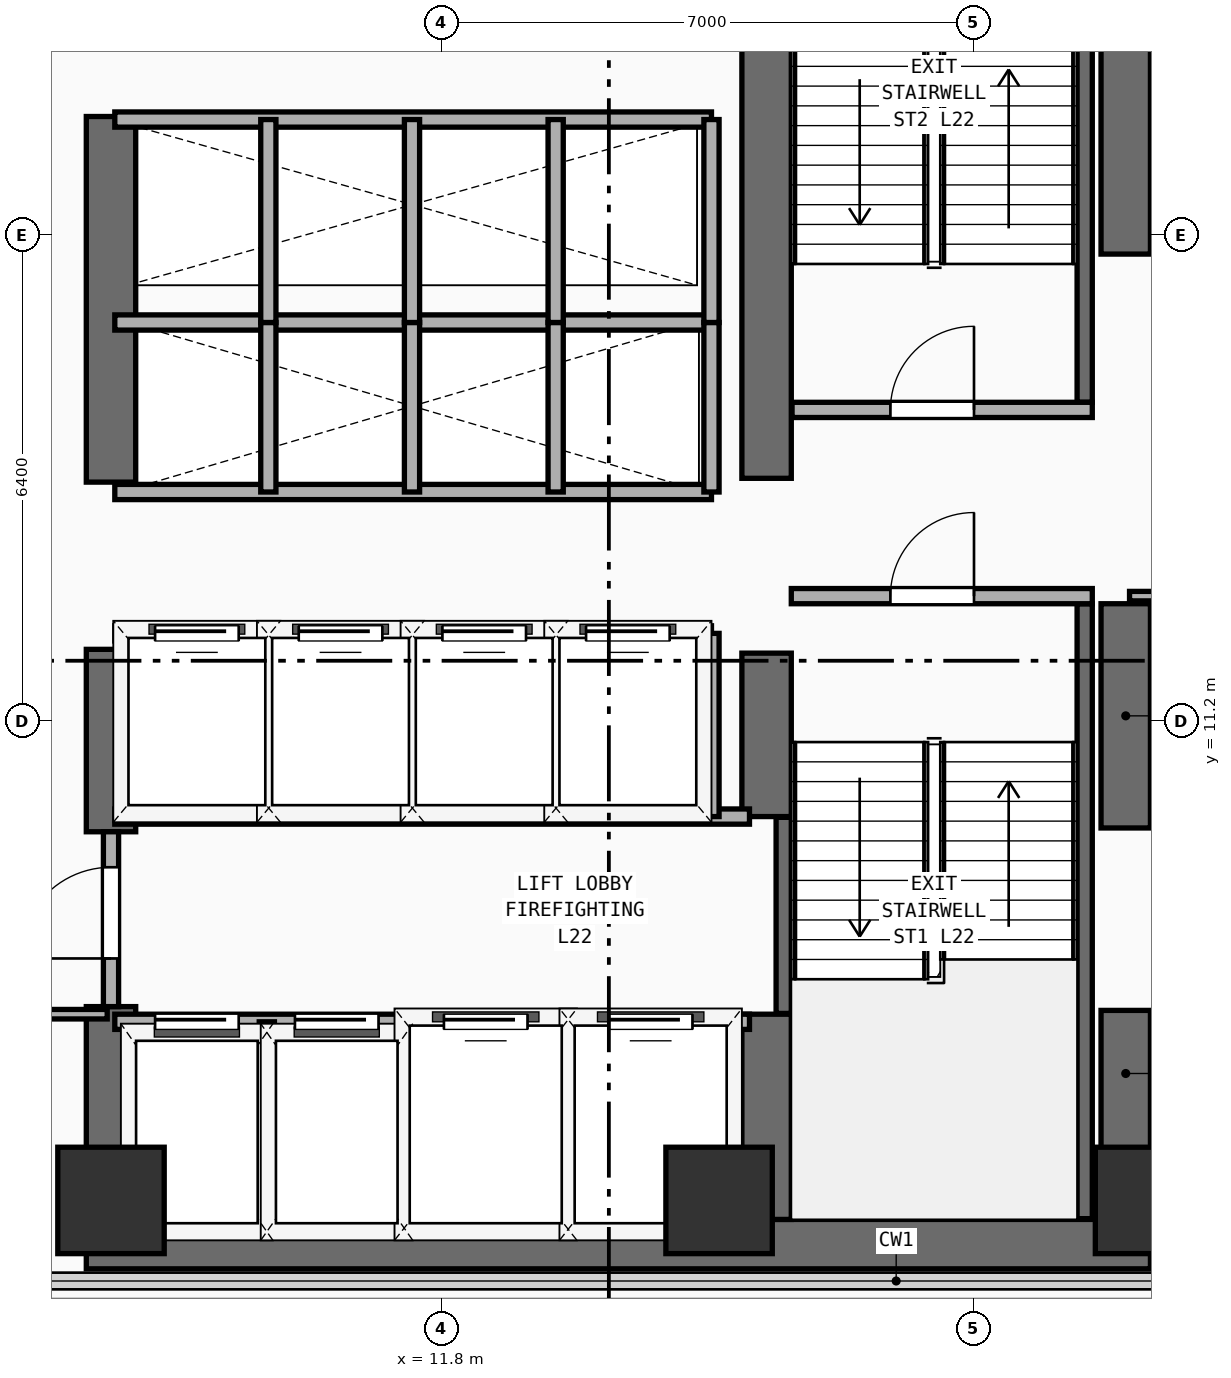
"""IFC4 building model, lengths in metres.
Left out: names, types, materials, properties, quantities, classifications, styles, units other than length and angle.
Written with IfcOpenShell. Run it as: python <this file> out.ifc"""

import sys

from ifc_helpers import new_model, si_unit, direction, frame, frame_2d, origin, origin_2d, place, context, subcontext, project, spatial, rectangle, extrude, element, fill, save


model = new_model("IFC4")
c1 = context("Model", 3, precision=1e-05, world=origin(), true_north=direction((0.0, 1.0)))
c2 = subcontext(c1, "Body", "Model", "MODEL_VIEW")
j1 = project(units=[si_unit("LENGTHUNIT", "METRE"), si_unit("PLANEANGLEUNIT", "RADIAN")], contexts=[c1])
p1 = place(None, origin())
s1 = spatial("IfcSite", under=j1, at=p1, CompositionType="ELEMENT")
p2 = place(p1, origin())
s2 = spatial("IfcBuilding", under=s1, at=p2, CompositionType="ELEMENT")
p3 = place(p2, frame((0.0, 0.0, 87.9)))
s3 = spatial("IfcBuildingStorey", under=s2, at=p3, CompositionType="ELEMENT", Elevation=87.9)
p4 = place(p3, frame((7.125, 4.325, 0.0), z_axis=(0.0, 0.0, 1.0), x_axis=(1.0, 0.0, 0.0)))
e1 = element("IfcWall", 1, at=p4, inside=s3, PredefinedType="SHEAR", context=c2, shape_type="SweptSolid", body=[
    extrude(rectangle(XDim=14.0, YDim=0.65, at=frame_2d((7.0, 0.0))), origin(), (0.0, 0.0, 1.0), 3.54),
])
p5 = place(p3, frame((7.45, 4.65, 0.0), z_axis=(0.0, 0.0, 1.0), x_axis=(0.0, 1.0, 0.0)))
e2 = element("IfcWall", 2, at=p5, inside=s3, PredefinedType="SHEAR", context=c2, shape_type="SweptSolid", body=[
    extrude(rectangle(XDim=2.8, YDim=0.65, at=frame_2d((1.4, 0.0))), origin(), (0.0, 0.0, 1.0), 3.54),
])
p6 = place(p3, frame((7.45, 9.75, 0.0), z_axis=(0.0, 0.0, 1.0), x_axis=(0.0, 1.0, 0.0)))
e3 = element("IfcWall", 3, at=p6, inside=s3, PredefinedType="SHEAR", context=c2, shape_type="SweptSolid", body=[
    extrude(rectangle(XDim=2.4, YDim=0.65, at=frame_2d((1.2, 0.0))), origin(), (0.0, 0.0, 1.0), 3.54),
])
p7 = place(p3, frame((7.45, 14.35, 0.0), z_axis=(0.0, 0.0, 1.0), x_axis=(0.0, 1.0, 0.0)))
e4 = element("IfcWall", 4, at=p7, inside=s3, PredefinedType="SHEAR", context=c2, shape_type="SweptSolid", body=[
    extrude(rectangle(XDim=4.81, YDim=0.65, at=frame_2d((2.405, 0.0))), origin(), (0.0, 0.0, 1.0), 3.54),
])
p8 = place(p3, frame((20.8, 4.65, 0.0), z_axis=(0.0, 0.0, 1.0), x_axis=(0.0, 1.0, 0.0)))
e5 = element("IfcWall", 5, at=p8, inside=s3, PredefinedType="SHEAR", context=c2, shape_type="SweptSolid", body=[
    extrude(rectangle(XDim=2.75, YDim=0.65, at=frame_2d((1.375, 0.0))), origin(), (0.0, 0.0, 1.0), 3.54),
])
p9 = place(p3, frame((20.8, 9.8, 0.0), z_axis=(0.0, 0.0, 1.0), x_axis=(0.0, 1.0, 0.0)))
e6 = element("IfcWall", 6, at=p9, inside=s3, PredefinedType="SHEAR", context=c2, shape_type="SweptSolid", body=[
    extrude(rectangle(XDim=2.95, YDim=0.65, at=frame_2d((1.475, 0.0))), origin(), (0.0, 0.0, 1.0), 3.54),
])
p10 = place(p3, frame((20.8, 17.35, 0.0), z_axis=(0.0, 0.0, 1.0), x_axis=(0.0, 1.0, 0.0)))
e7 = element("IfcWall", 7, at=p10, inside=s3, PredefinedType="SHEAR", context=c2, shape_type="SweptSolid", body=[
    extrude(rectangle(XDim=6.15, YDim=0.65, at=frame_2d((3.075, 0.0))), origin(), (0.0, 0.0, 1.0), 3.54),
])
p11 = place(p3, frame((16.075, 4.65, 0.0), z_axis=(0.0, 0.0, 1.0), x_axis=(0.0, 1.0, 0.0)))
e8 = element("IfcWall", 8, at=p11, inside=s3, PredefinedType="SHEAR", context=c2, shape_type="SweptSolid", body=[
    extrude(rectangle(XDim=2.7, YDim=0.65, at=frame_2d((1.35, 0.0))), origin(), (0.0, 0.0, 1.0), 3.54),
])
p12 = place(p3, frame((16.075, 9.95, 0.0), z_axis=(0.0, 0.0, 1.0), x_axis=(0.0, 1.0, 0.0)))
e9 = element("IfcWall", 9, at=p12, inside=s3, PredefinedType="SHEAR", context=c2, shape_type="SweptSolid", body=[
    extrude(rectangle(XDim=2.15, YDim=0.65, at=frame_2d((1.075, 0.0))), origin(), (0.0, 0.0, 1.0), 3.54),
])
p13 = place(p3, frame((16.075, 14.4, 0.0), z_axis=(0.0, 0.0, 1.0), x_axis=(0.0, 1.0, 0.0)))
e10 = element("IfcWall", 10, at=p13, inside=s3, PredefinedType="SHEAR", context=c2, shape_type="SweptSolid", body=[
    extrude(rectangle(XDim=9.1, YDim=0.65, at=frame_2d((4.55, 0.0))), origin(), (0.0, 0.0, 1.0), 3.54),
])
for number, where, z_axis, x_axis in (
    (11, (7.45, 4.9, 0.0), (0.0, 0.0, 1.0), (1.0, 0.0, 0.0)),
    (12, (15.45, 4.9, 0.0), (0.0, 0.0, 1.0), (1.0, 0.0, 0.0)),
    (13, (21.1, 4.9, 0.0), (0.0, 0.0, 1.0), (1.0, 0.0, 0.0)),
):
    element("IfcColumn", number, at=place(p3, frame(where, z_axis=z_axis, x_axis=x_axis)), inside=s3, PredefinedType="COLUMN", context=c2, shape_type="SweptSolid", body=[
        extrude(rectangle(XDim=1.4, YDim=1.4, at=origin_2d()), origin(), (0.0, 0.0, 1.0), 3.54),
    ])
p14 = place(p3, frame((16.3, 7.36, 0.0), z_axis=(0.0, 0.0, 1.0), x_axis=(0.0, 1.0, 0.0)))
e14 = element("IfcWall", 14, at=p14, inside=s3, PredefinedType="SHEAR", context=c2, shape_type="SweptSolid", body=[
    extrude(rectangle(XDim=2.58, YDim=0.2, at=frame_2d((1.29, 0.0))), origin(), (0.0, 0.0, 1.0), 3.54),
])
p15 = place(p3, frame((20.26, 4.66, 0.0), z_axis=(0.0, 0.0, 1.0), x_axis=(0.0, 1.0, 0.0)))
e15 = element("IfcWall", 15, at=p15, inside=s3, PredefinedType="SHEAR", context=c2, shape_type="SweptSolid", body=[
    extrude(rectangle(XDim=8.09, YDim=0.2, at=frame_2d((4.045, 0.0))), origin(), (0.0, 0.0, 1.0), 3.54),
])
p16 = place(p3, frame((16.4, 12.85, 0.0), z_axis=(0.0, 0.0, 1.0), x_axis=(1.0, 0.0, 0.0)))
e16 = element("IfcWall", 16, at=p16, inside=s3, PredefinedType="PARTITIONING", context=c2, shape_type="SweptSolid", body=[
    extrude(rectangle(XDim=3.96, YDim=0.2, at=frame_2d((1.98, 0.0))), origin(), (0.0, 0.0, 1.0), 3.54),
])
p17 = place(p16, frame((1.304, 0.0, 0.0)))
e17 = element("IfcOpeningElement", 17, at=p17, cuts=e16, PredefinedType="OPENING", context=c2, shape_type="SweptSolid", body=[
    extrude(rectangle(XDim=1.1, YDim=2.2, at=frame_2d((0.55, 1.1))), frame((0.0, 0.11, 0.0), z_axis=(0.0, -1.0, 0.0), x_axis=(1.0, 0.0, 0.0)), (0.0, 0.0, 1.0), 0.22),
])
p18 = place(p3, frame((20.26, 15.4, 0.0), z_axis=(0.0, 0.0, 1.0), x_axis=(0.0, 1.0, 0.0)))
e18 = element("IfcWall", 18, at=p18, inside=s3, PredefinedType="SHEAR", context=c2, shape_type="SweptSolid", body=[
    extrude(rectangle(XDim=8.09, YDim=0.2, at=frame_2d((4.045, 0.0))), origin(), (0.0, 0.0, 1.0), 3.54),
])
p19 = place(p3, frame((16.41, 15.3, 0.0), z_axis=(0.0, 0.0, 1.0), x_axis=(1.0, 0.0, 0.0)))
e19 = element("IfcWall", 19, at=p19, inside=s3, PredefinedType="PARTITIONING", context=c2, shape_type="SweptSolid", body=[
    extrude(rectangle(XDim=3.95, YDim=0.2, at=frame_2d((1.975, 0.0))), origin(), (0.0, 0.0, 1.0), 3.54),
])
p20 = place(p19, frame((1.294, 0.0, 0.0)))
e20 = element("IfcOpeningElement", 20, at=p20, cuts=e19, PredefinedType="OPENING", context=c2, shape_type="SweptSolid", body=[
    extrude(rectangle(XDim=1.1, YDim=2.2, at=frame_2d((0.55, 1.1))), frame((0.0, 0.11, 0.0), z_axis=(0.0, -1.0, 0.0), x_axis=(1.0, 0.0, 0.0)), (0.0, 0.0, 1.0), 0.22),
])
p21 = place(p3, frame((7.5, 7.25, 0.0), z_axis=(0.0, 0.0, 1.0), x_axis=(1.0, 0.0, 0.0)))
e21 = element("IfcWall", 21, at=p21, inside=s3, PredefinedType="PARTITIONING", context=c2, shape_type="SweptSolid", body=[
    extrude(rectangle(XDim=8.35, YDim=0.2, at=frame_2d((4.175, 0.0))), origin(), (0.0, 0.0, 1.0), 3.54),
])
p22 = place(p21, frame((0.53, 0.0, 0.0)))
e22 = element("IfcOpeningElement", 22, at=p22, cuts=e21, PredefinedType="OPENING", context=c2, shape_type="SweptSolid", body=[
    extrude(rectangle(XDim=1.1, YDim=2.2, at=frame_2d((0.55, 1.1))), frame((0.0, 0.11, 0.0), z_axis=(0.0, -1.0, 0.0), x_axis=(1.0, 0.0, 0.0)), (0.0, 0.0, 1.0), 0.22),
])
p23 = place(p21, frame((2.37, 0.0, 0.0)))
e23 = element("IfcOpeningElement", 23, at=p23, cuts=e21, PredefinedType="OPENING", context=c2, shape_type="SweptSolid", body=[
    extrude(rectangle(XDim=1.1, YDim=2.2, at=frame_2d((0.55, 1.1))), frame((0.0, 0.11, 0.0), z_axis=(0.0, -1.0, 0.0), x_axis=(1.0, 0.0, 0.0)), (0.0, 0.0, 1.0), 0.22),
])
p24 = place(p21, frame((4.33, 0.0, 0.0)))
e24 = element("IfcOpeningElement", 24, at=p24, cuts=e21, PredefinedType="OPENING", context=c2, shape_type="SweptSolid", body=[
    extrude(rectangle(XDim=1.1, YDim=2.2, at=frame_2d((0.55, 1.1))), frame((0.0, 0.11, 0.0), z_axis=(0.0, -1.0, 0.0), x_axis=(1.0, 0.0, 0.0)), (0.0, 0.0, 1.0), 0.22),
])
p25 = place(p21, frame((6.5, 0.0, 0.0)))
e25 = element("IfcOpeningElement", 25, at=p25, cuts=e21, PredefinedType="OPENING", context=c2, shape_type="SweptSolid", body=[
    extrude(rectangle(XDim=1.1, YDim=2.2, at=frame_2d((0.55, 1.1))), frame((0.0, 0.11, 0.0), z_axis=(0.0, -1.0, 0.0), x_axis=(1.0, 0.0, 0.0)), (0.0, 0.0, 1.0), 0.22),
])
p26 = place(p3, frame((7.5, 9.95, 0.0), z_axis=(0.0, 0.0, 1.0), x_axis=(1.0, 0.0, 0.0)))
e26 = element("IfcWall", 26, at=p26, inside=s3, PredefinedType="PARTITIONING", context=c2, shape_type="SweptSolid", body=[
    extrude(rectangle(XDim=8.35, YDim=0.2, at=frame_2d((4.175, 0.0))), origin(), (0.0, 0.0, 1.0), 3.54),
])
for number, where, z_axis, x_axis in (
    (27, (9.5, 4.45, 0.0), (0.0, 0.0, 1.0), (0.0, 1.0, 0.0)),
    (28, (11.36, 4.45, 0.0), (0.0, 0.0, 1.0), (0.0, 1.0, 0.0)),
    (29, (13.46, 4.45, 0.0), (0.0, 0.0, 1.0), (0.0, 1.0, 0.0)),
):
    element("IfcWall", number, at=place(p3, frame(where, z_axis=z_axis, x_axis=x_axis)), inside=s3, PredefinedType="PARTITIONING", context=c2, shape_type="SweptSolid", body=[
        extrude(rectangle(XDim=2.8, YDim=0.2, at=frame_2d((1.4, 0.0))), origin(), (0.0, 0.0, 1.0), 3.54),
    ])
p27 = place(p3, frame((7.45, 7.45, 0.0), z_axis=(0.0, 0.0, 1.0), x_axis=(0.0, 1.0, 0.0)))
e30 = element("IfcWall", 30, at=p27, inside=s3, PredefinedType="PARTITIONING", context=c2, shape_type="SweptSolid", body=[
    extrude(rectangle(XDim=2.3, YDim=0.2, at=frame_2d((1.15, 0.0))), origin(), (0.0, 0.0, 1.0), 2.52),
])
p28 = place(p27, frame((0.633, 0.0, 0.0)))
e31 = element("IfcOpeningElement", 31, at=p28, cuts=e30, PredefinedType="OPENING", context=c2, shape_type="SweptSolid", body=[
    extrude(rectangle(XDim=1.2, YDim=2.25, at=frame_2d((0.6, 1.125))), frame((0.0, 0.11, 0.0), z_axis=(0.0, -1.0, 0.0), x_axis=(1.0, 0.0, 0.0)), (0.0, 0.0, 1.0), 0.22),
])
p29 = place(p3, frame((7.5, 12.36, 0.0), z_axis=(0.0, 0.0, 1.0), x_axis=(1.0, 0.0, 0.0)))
e32 = element("IfcWall", 32, at=p29, inside=s3, PredefinedType="PARTITIONING", context=c2, shape_type="SweptSolid", body=[
    extrude(rectangle(XDim=7.85, YDim=0.2, at=frame_2d((3.925, 0.0))), origin(), (0.0, 0.0, 1.0), 3.54),
])
p30 = place(p29, frame((0.53, 0.0, 0.0)))
e33 = element("IfcOpeningElement", 33, at=p30, cuts=e32, PredefinedType="OPENING", context=c2, shape_type="SweptSolid", body=[
    extrude(rectangle(XDim=1.1, YDim=2.2, at=frame_2d((0.55, 1.1))), frame((0.0, 0.11, 0.0), z_axis=(0.0, -1.0, 0.0), x_axis=(1.0, 0.0, 0.0)), (0.0, 0.0, 1.0), 0.22),
])
p31 = place(p29, frame((2.42, 0.0, 0.0)))
e34 = element("IfcOpeningElement", 34, at=p31, cuts=e32, PredefinedType="OPENING", context=c2, shape_type="SweptSolid", body=[
    extrude(rectangle(XDim=1.1, YDim=2.2, at=frame_2d((0.55, 1.1))), frame((0.0, 0.11, 0.0), z_axis=(0.0, -1.0, 0.0), x_axis=(1.0, 0.0, 0.0)), (0.0, 0.0, 1.0), 0.22),
])
p32 = place(p29, frame((4.31, 0.0, 0.0)))
e35 = element("IfcOpeningElement", 35, at=p32, cuts=e32, PredefinedType="OPENING", context=c2, shape_type="SweptSolid", body=[
    extrude(rectangle(XDim=1.1, YDim=2.2, at=frame_2d((0.55, 1.1))), frame((0.0, 0.11, 0.0), z_axis=(0.0, -1.0, 0.0), x_axis=(1.0, 0.0, 0.0)), (0.0, 0.0, 1.0), 0.22),
])
p33 = place(p29, frame((6.2, 0.0, 0.0)))
e36 = element("IfcOpeningElement", 36, at=p33, cuts=e32, PredefinedType="OPENING", context=c2, shape_type="SweptSolid", body=[
    extrude(rectangle(XDim=1.1, YDim=2.2, at=frame_2d((0.55, 1.1))), frame((0.0, 0.11, 0.0), z_axis=(0.0, -1.0, 0.0), x_axis=(1.0, 0.0, 0.0)), (0.0, 0.0, 1.0), 0.22),
])
for number, where, z_axis, x_axis in (
    (37, (15.35, 9.95, 0.0), (0.0, 0.0, 1.0), (0.0, 1.0, 0.0)),
    (38, (9.52, 9.95, 0.0), (0.0, 0.0, 1.0), (0.0, 1.0, 0.0)),
    (39, (11.41, 9.95, 0.0), (0.0, 0.0, 1.0), (0.0, 1.0, 0.0)),
    (40, (13.3, 9.95, 0.0), (0.0, 0.0, 1.0), (0.0, 1.0, 0.0)),
):
    element("IfcWall", number, at=place(p3, frame(where, z_axis=z_axis, x_axis=x_axis)), inside=s3, PredefinedType="PARTITIONING", context=c2, shape_type="SweptSolid", body=[
        extrude(rectangle(XDim=2.41, YDim=0.2, at=frame_2d((1.205, 0.0))), origin(), (0.0, 0.0, 1.0), 3.54),
    ])
for number, where, z_axis, x_axis in (
    (41, (7.5, 14.22, 0.0), (0.0, 0.0, 1.0), (1.0, 0.0, 0.0)),
    (42, (7.5, 16.45, 0.0), (0.0, 0.0, 1.0), (1.0, 0.0, 0.0)),
):
    element("IfcWall", number, at=place(p3, frame(where, z_axis=z_axis, x_axis=x_axis)), inside=s3, PredefinedType="PARTITIONING", context=c2, shape_type="SweptSolid", body=[
        extrude(rectangle(XDim=7.85, YDim=0.2, at=frame_2d((3.925, 0.0))), origin(), (0.0, 0.0, 1.0), 3.54),
    ])
for number, where, z_axis, x_axis in (
    (43, (15.35, 14.22, 0.0), (0.0, 0.0, 1.0), (0.0, 1.0, 0.0)),
    (44, (9.52, 14.22, 0.0), (0.0, 0.0, 1.0), (0.0, 1.0, 0.0)),
    (45, (11.41, 14.22, 0.0), (0.0, 0.0, 1.0), (0.0, 1.0, 0.0)),
    (46, (13.3, 14.22, 0.0), (0.0, 0.0, 1.0), (0.0, 1.0, 0.0)),
):
    element("IfcWall", number, at=place(p3, frame(where, z_axis=z_axis, x_axis=x_axis)), inside=s3, PredefinedType="PARTITIONING", context=c2, shape_type="SweptSolid", body=[
        extrude(rectangle(XDim=2.23, YDim=0.2, at=frame_2d((1.115, 0.0))), origin(), (0.0, 0.0, 1.0), 3.54),
    ])
p34 = place(p3, frame((7.5, 19.12, 0.0), z_axis=(0.0, 0.0, 1.0), x_axis=(1.0, 0.0, 0.0)))
e47 = element("IfcWall", 47, at=p34, inside=s3, PredefinedType="PARTITIONING", context=c2, shape_type="SweptSolid", body=[
    extrude(rectangle(XDim=7.85, YDim=0.2, at=frame_2d((3.925, 0.0))), origin(), (0.0, 0.0, 1.0), 3.54),
])
for number, where, z_axis, x_axis in (
    (48, (15.35, 16.45, 0.0), (0.0, 0.0, 1.0), (0.0, 1.0, 0.0)),
    (49, (9.52, 16.45, 0.0), (0.0, 0.0, 1.0), (0.0, 1.0, 0.0)),
    (50, (11.41, 16.45, 0.0), (0.0, 0.0, 1.0), (0.0, 1.0, 0.0)),
    (51, (13.3, 16.45, 0.0), (0.0, 0.0, 1.0), (0.0, 1.0, 0.0)),
):
    element("IfcWall", number, at=place(p3, frame(where, z_axis=z_axis, x_axis=x_axis)), inside=s3, PredefinedType="PARTITIONING", context=c2, shape_type="SweptSolid", body=[
        extrude(rectangle(XDim=2.67, YDim=0.2, at=frame_2d((1.335, 0.0))), origin(), (0.0, 0.0, 1.0), 3.54),
    ])
p35 = place(p3, frame((1.64, 7.35, 0.0), z_axis=(0.0, 0.0, 1.0), x_axis=(1.0, 0.0, 0.0)))
e52 = element("IfcWall", 52, at=p35, inside=s3, PredefinedType="PARTITIONING", context=c2, shape_type="SweptSolid", body=[
    extrude(rectangle(XDim=5.76, YDim=0.125, at=frame_2d((2.88, 0.0))), origin(), (0.0, 0.0, 1.0), 3.54),
])
p36 = place(p35, frame((4.087, 0.0, 0.0)))
e53 = element("IfcOpeningElement", 53, at=p36, cuts=e52, PredefinedType="OPENING", context=c2, shape_type="SweptSolid", body=[
    extrude(rectangle(XDim=0.85, YDim=2.15, at=frame_2d((0.425, 1.075))), frame((0.0, 0.073, 0.0), z_axis=(0.0, -1.0, 0.0), x_axis=(1.0, 0.0, 0.0)), (0.0, 0.0, 1.0), 0.145),
])
p37 = place(p3, frame((20.85, 12.85, 0.0), z_axis=(0.0, 0.0, 1.0), x_axis=(1.0, 0.0, 0.0)))
e54 = element("IfcWall", 54, at=p37, inside=s3, PredefinedType="PARTITIONING", context=c2, shape_type="SweptSolid", body=[
    extrude(rectangle(XDim=7.05, YDim=0.125, at=frame_2d((3.525, 0.0))), origin(), (0.0, 0.0, 1.0), 3.54),
])
p38 = place(p37, frame((2.8, 0.0, 0.0)))
e55 = element("IfcOpeningElement", 55, at=p38, cuts=e54, PredefinedType="OPENING", context=c2, shape_type="SweptSolid", body=[
    extrude(rectangle(XDim=0.95, YDim=2.15, at=frame_2d((0.475, 1.075))), frame((0.0, 0.073, 0.0), z_axis=(0.0, -1.0, 0.0), x_axis=(1.0, 0.0, 0.0)), (0.0, 0.0, 1.0), 0.145),
])
p39 = place(p17, frame((1.1, 0.0, 0.0), z_axis=(0.0, 0.0, 1.0), x_axis=(-1.0, 0.0, 0.0)))
e56 = element("IfcDoor", 56, at=p39, inside=s3, OperationType="SINGLE_SWING_LEFT", PredefinedType="DOOR", context=c2, shape_type="SweptSolid", body=[
    extrude(rectangle(XDim=1.1, YDim=2.2, at=frame_2d((0.55, 1.1))), frame((0.0, 0.025, 0.0), z_axis=(0.0, -1.0, 0.0), x_axis=(1.0, 0.0, 0.0)), (0.0, 0.0, 1.0), 0.05),
])
fill(e17, e56)
p40 = place(p20, origin())
e57 = element("IfcDoor", 57, at=p40, inside=s3, OperationType="SINGLE_SWING_RIGHT", PredefinedType="DOOR", context=c2, shape_type="SweptSolid", body=[
    extrude(rectangle(XDim=1.1, YDim=2.2, at=frame_2d((0.55, 1.1))), frame((0.0, 0.025, 0.0), z_axis=(0.0, -1.0, 0.0), x_axis=(1.0, 0.0, 0.0)), (0.0, 0.0, 1.0), 0.05),
])
fill(e20, e57)
p41 = place(p22, origin())
e58 = element("IfcDoor", 58, at=p41, inside=s3, OperationType="SLIDING_TO_LEFT", PredefinedType="DOOR", context=c2, shape_type="SweptSolid", body=[
    extrude(rectangle(XDim=1.1, YDim=2.2, at=frame_2d((0.55, 1.1))), frame((0.0, 0.025, 0.0), z_axis=(0.0, -1.0, 0.0), x_axis=(1.0, 0.0, 0.0)), (0.0, 0.0, 1.0), 0.05),
])
fill(e22, e58)
p42 = place(p23, origin())
e59 = element("IfcDoor", 59, at=p42, inside=s3, OperationType="SLIDING_TO_LEFT", PredefinedType="DOOR", context=c2, shape_type="SweptSolid", body=[
    extrude(rectangle(XDim=1.1, YDim=2.2, at=frame_2d((0.55, 1.1))), frame((0.0, 0.025, 0.0), z_axis=(0.0, -1.0, 0.0), x_axis=(1.0, 0.0, 0.0)), (0.0, 0.0, 1.0), 0.05),
])
fill(e23, e59)
p43 = place(p24, origin())
e60 = element("IfcDoor", 60, at=p43, inside=s3, OperationType="SLIDING_TO_LEFT", PredefinedType="DOOR", context=c2, shape_type="SweptSolid", body=[
    extrude(rectangle(XDim=1.1, YDim=2.2, at=frame_2d((0.55, 1.1))), frame((0.0, 0.025, 0.0), z_axis=(0.0, -1.0, 0.0), x_axis=(1.0, 0.0, 0.0)), (0.0, 0.0, 1.0), 0.05),
])
fill(e24, e60)
p44 = place(p25, origin())
e61 = element("IfcDoor", 61, at=p44, inside=s3, OperationType="SLIDING_TO_LEFT", PredefinedType="DOOR", context=c2, shape_type="SweptSolid", body=[
    extrude(rectangle(XDim=1.1, YDim=2.2, at=frame_2d((0.55, 1.1))), frame((0.0, 0.025, 0.0), z_axis=(0.0, -1.0, 0.0), x_axis=(1.0, 0.0, 0.0)), (0.0, 0.0, 1.0), 0.05),
])
fill(e25, e61)
p45 = place(p28, frame((1.2, 0.0, 0.0), z_axis=(0.0, 0.0, 1.0), x_axis=(-1.0, 0.0, 0.0)))
e62 = element("IfcDoor", 62, at=p45, inside=s3, OperationType="SINGLE_SWING_RIGHT", PredefinedType="DOOR", context=c2, shape_type="SweptSolid", body=[
    extrude(rectangle(XDim=1.2, YDim=2.25, at=frame_2d((0.6, 1.125))), frame((0.0, 0.025, 0.0), z_axis=(0.0, -1.0, 0.0), x_axis=(1.0, 0.0, 0.0)), (0.0, 0.0, 1.0), 0.05),
])
fill(e31, e62)
p46 = place(p30, origin())
e63 = element("IfcDoor", 63, at=p46, inside=s3, OperationType="SLIDING_TO_LEFT", PredefinedType="DOOR", context=c2, shape_type="SweptSolid", body=[
    extrude(rectangle(XDim=1.1, YDim=2.2, at=frame_2d((0.55, 1.1))), frame((0.0, 0.025, 0.0), z_axis=(0.0, -1.0, 0.0), x_axis=(1.0, 0.0, 0.0)), (0.0, 0.0, 1.0), 0.05),
])
fill(e33, e63)
p47 = place(p31, origin())
e64 = element("IfcDoor", 64, at=p47, inside=s3, OperationType="SLIDING_TO_LEFT", PredefinedType="DOOR", context=c2, shape_type="SweptSolid", body=[
    extrude(rectangle(XDim=1.1, YDim=2.2, at=frame_2d((0.55, 1.1))), frame((0.0, 0.025, 0.0), z_axis=(0.0, -1.0, 0.0), x_axis=(1.0, 0.0, 0.0)), (0.0, 0.0, 1.0), 0.05),
])
fill(e34, e64)
p48 = place(p32, origin())
e65 = element("IfcDoor", 65, at=p48, inside=s3, OperationType="SLIDING_TO_LEFT", PredefinedType="DOOR", context=c2, shape_type="SweptSolid", body=[
    extrude(rectangle(XDim=1.1, YDim=2.2, at=frame_2d((0.55, 1.1))), frame((0.0, 0.025, 0.0), z_axis=(0.0, -1.0, 0.0), x_axis=(1.0, 0.0, 0.0)), (0.0, 0.0, 1.0), 0.05),
])
fill(e35, e65)
p49 = place(p33, origin())
e66 = element("IfcDoor", 66, at=p49, inside=s3, OperationType="SLIDING_TO_LEFT", PredefinedType="DOOR", context=c2, shape_type="SweptSolid", body=[
    extrude(rectangle(XDim=1.1, YDim=2.2, at=frame_2d((0.55, 1.1))), frame((0.0, 0.025, 0.0), z_axis=(0.0, -1.0, 0.0), x_axis=(1.0, 0.0, 0.0)), (0.0, 0.0, 1.0), 0.05),
])
fill(e36, e66)
save(model, sys.argv[1])
